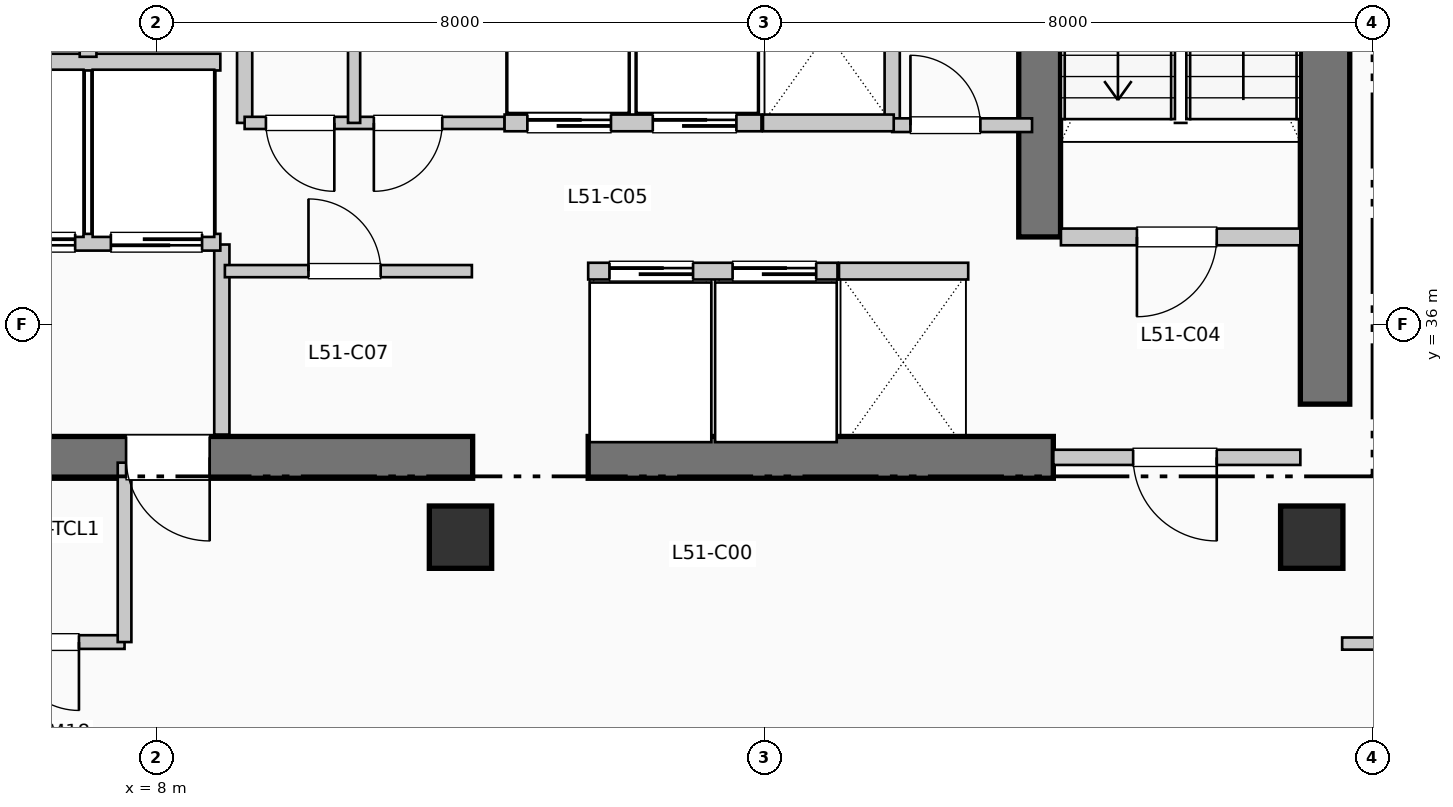
"""IFC4 building model, lengths in metres.
Left out: names, types, materials, properties, quantities, classifications, styles, units other than length and angle.
Written with IfcOpenShell. Run it as: python <this file> out.ifc"""

import sys

from ifc_helpers import new_model, si_unit, direction, frame, frame_2d, origin, origin_2d, place, context, subcontext, project, spatial, rectangle, extrude, element, fill, save


model = new_model("IFC4")
c1 = context("Model", 3, precision=1e-05, world=origin(), true_north=direction((0.0, 1.0)))
c2 = subcontext(c1, "Body", "Model", "MODEL_VIEW")
j1 = project(units=[si_unit("LENGTHUNIT", "METRE"), si_unit("PLANEANGLEUNIT", "RADIAN")], contexts=[c1])
p1 = place(None, origin())
s1 = spatial("IfcSite", under=j1, at=p1, CompositionType="ELEMENT")
p2 = place(p1, origin())
s2 = spatial("IfcBuilding", under=s1, at=p2, CompositionType="ELEMENT")
p3 = place(p2, frame((0.0, 0.0, 211.2)))
s3 = spatial("IfcBuildingStorey", under=s2, at=p3, CompositionType="ELEMENT", Elevation=211.2)
p4 = place(p3, frame((23.375, 34.95, 0.0), z_axis=(0.0, 0.0, 1.0), x_axis=(0.0, 1.0, 0.0)))
e1 = element("IfcWall", 1, at=p4, inside=s3, PredefinedType="SHEAR", context=c2, shape_type="SweptSolid", body=[
    extrude(rectangle(XDim=10.64, YDim=0.65, at=frame_2d((5.32, 0.0))), origin(), (0.0, 0.0, 1.0), 3.96),
])
p5 = place(p3, frame((1.45, 34.25, 0.0), z_axis=(0.0, 0.0, 1.0), x_axis=(1.0, 0.0, 0.0)))
e2 = element("IfcWall", 2, at=p5, inside=s3, PredefinedType="SHEAR", context=c2, shape_type="SweptSolid", body=[
    extrude(rectangle(XDim=10.71, YDim=0.55, at=frame_2d((5.355, 0.0))), origin(), (0.0, 0.0, 1.0), 3.96),
])
p6 = place(p5, frame((7.25, 0.0, 0.0), z_axis=(0.0, 0.0, 1.0), x_axis=(-1.0, 0.0, 0.0)))
e3 = element("IfcOpeningElement", 3, at=p6, cuts=e2, PredefinedType="OPENING", context=c2, shape_type="SweptSolid", body=[
    extrude(rectangle(XDim=1.1, YDim=2.15, at=frame_2d((0.55, 1.075))), frame((0.0, 0.285, 0.0), z_axis=(0.0, -1.0, 0.0), x_axis=(1.0, 0.0, 0.0)), (0.0, 0.0, 1.0), 0.57),
])
p7 = place(p3, frame((13.68, 34.25, 0.0), z_axis=(0.0, 0.0, 1.0), x_axis=(1.0, 0.0, 0.0)))
e4 = element("IfcWall", 4, at=p7, inside=s3, PredefinedType="SHEAR", context=c2, shape_type="SweptSolid", body=[
    extrude(rectangle(XDim=6.12, YDim=0.55, at=frame_2d((3.06, 0.0))), origin(), (0.0, 0.0, 1.0), 3.96),
])
p8 = place(p3, frame((19.62, 37.15, 0.0), z_axis=(0.0, 0.0, 1.0), x_axis=(0.0, 1.0, 0.0)))
e5 = element("IfcWall", 5, at=p8, inside=s3, PredefinedType="SHEAR", context=c2, shape_type="SweptSolid", body=[
    extrude(rectangle(XDim=7.89, YDim=0.55, at=frame_2d((3.945, 0.0))), origin(), (0.0, 0.0, 1.0), 3.96),
])
for number, where, z_axis, x_axis in (
    (6, (12.0, 33.2, 0.0), (0.0, 0.0, 1.0), (1.0, 0.0, 0.0)),
    (7, (23.2, 33.2, 0.0), (0.0, 0.0, 1.0), (1.0, 0.0, 0.0)),
):
    element("IfcColumn", number, at=place(p3, frame(where, z_axis=z_axis, x_axis=x_axis)), inside=s3, PredefinedType="COLUMN", context=c2, shape_type="SweptSolid", body=[
        extrude(rectangle(XDim=0.82, YDim=0.82, at=origin_2d()), origin(), (0.0, 0.0, 1.0), 3.96),
    ])
p9 = place(p3, frame((8.86, 34.55, 0.0), z_axis=(0.0, 0.0, 1.0), x_axis=(0.0, 1.0, 0.0)))
e8 = element("IfcWall", 8, at=p9, inside=s3, PredefinedType="PARTITIONING", context=c2, shape_type="SweptSolid", body=[
    extrude(rectangle(XDim=2.5, YDim=0.2, at=frame_2d((1.25, 0.0))), origin(), (0.0, 0.0, 1.0), 3.71),
])
p10 = place(p3, frame((19.9, 37.15, 0.0), z_axis=(0.0, 0.0, 1.0), x_axis=(1.0, 0.0, 0.0)))
e9 = element("IfcWall", 9, at=p10, inside=s3, PredefinedType="PARTITIONING", context=c2, shape_type="SweptSolid", body=[
    extrude(rectangle(XDim=3.15, YDim=0.22, at=frame_2d((1.575, 0.0))), origin(), (0.0, 0.0, 1.0), 3.71),
])
p11 = place(p10, frame((2.05, 0.0, 0.0), z_axis=(0.0, 0.0, 1.0), x_axis=(-1.0, 0.0, 0.0)))
e10 = element("IfcOpeningElement", 10, at=p11, cuts=e9, PredefinedType="OPENING", context=c2, shape_type="SweptSolid", body=[
    extrude(rectangle(XDim=1.05, YDim=2.15, at=frame_2d((0.525, 1.075))), frame((0.0, 0.12, 0.0), z_axis=(0.0, -1.0, 0.0), x_axis=(1.0, 0.0, 0.0)), (0.0, 0.0, 1.0), 0.24),
])
p12 = place(p3, frame((19.8, 34.25, 0.0), z_axis=(0.0, 0.0, 1.0), x_axis=(1.0, 0.0, 0.0)))
e11 = element("IfcWall", 11, at=p12, inside=s3, PredefinedType="PARTITIONING", context=c2, shape_type="SweptSolid", body=[
    extrude(rectangle(XDim=3.25, YDim=0.2, at=frame_2d((1.625, 0.0))), origin(), (0.0, 0.0, 1.0), 3.71),
])
p13 = place(p12, frame((2.15, 0.0, 0.0), z_axis=(0.0, 0.0, 1.0), x_axis=(-1.0, 0.0, 0.0)))
e12 = element("IfcOpeningElement", 12, at=p13, cuts=e11, PredefinedType="OPENING", context=c2, shape_type="SweptSolid", body=[
    extrude(rectangle(XDim=1.1, YDim=2.15, at=frame_2d((0.55, 1.075))), frame((0.0, 0.11, 0.0), z_axis=(0.0, -1.0, 0.0), x_axis=(1.0, 0.0, 0.0)), (0.0, 0.0, 1.0), 0.22),
])
p14 = place(p3, frame((5.38, 37.08, 0.0), z_axis=(0.0, 0.0, 1.0), x_axis=(1.0, 0.0, 0.0)))
e13 = element("IfcWall", 13, at=p14, inside=s3, PredefinedType="PARTITIONING", context=c2, shape_type="SweptSolid", body=[
    extrude(rectangle(XDim=3.46, YDim=0.22, at=frame_2d((1.73, 0.0))), origin(), (0.0, 0.0, 1.0), 3.71),
])
p15 = place(p14, frame((1.55, 0.0, 0.0), z_axis=(0.0, 0.0, 1.0), x_axis=(-1.0, 0.0, 0.0)))
e14 = element("IfcOpeningElement", 14, at=p15, cuts=e13, PredefinedType="OPENING", context=c2, shape_type="SweptSolid", body=[
    extrude(rectangle(XDim=1.2, YDim=2.2, at=frame_2d((0.6, 1.1))), frame((0.0, 0.12, 0.0), z_axis=(0.0, -1.0, 0.0), x_axis=(1.0, 0.0, 0.0)), (0.0, 0.0, 1.0), 0.24),
])
p16 = place(p14, frame((3.22, 0.0, 0.0), z_axis=(0.0, 0.0, 1.0), x_axis=(-1.0, 0.0, 0.0)))
e15 = element("IfcOpeningElement", 15, at=p16, cuts=e13, PredefinedType="OPENING", context=c2, shape_type="SweptSolid", body=[
    extrude(rectangle(XDim=1.2, YDim=2.2, at=frame_2d((0.6, 1.1))), frame((0.0, 0.12, 0.0), z_axis=(0.0, -1.0, 0.0), x_axis=(1.0, 0.0, 0.0)), (0.0, 0.0, 1.0), 0.24),
])
p17 = place(p3, frame((5.38, 39.45, 0.0), z_axis=(0.0, 0.0, 1.0), x_axis=(1.0, 0.0, 0.0)))
e16 = element("IfcWall", 16, at=p17, inside=s3, PredefinedType="PARTITIONING", context=c2, shape_type="SweptSolid", body=[
    extrude(rectangle(XDim=3.46, YDim=0.22, at=frame_2d((1.73, 0.0))), origin(), (0.0, 0.0, 1.0), 3.71),
])
p18 = place(p3, frame((7.1, 39.52, 0.0), z_axis=(0.0, 0.0, 1.0), x_axis=(0.0, 1.0, 0.0)))
e17 = element("IfcWall", 17, at=p18, inside=s3, PredefinedType="PARTITIONING", context=c2, shape_type="SweptSolid", body=[
    extrude(rectangle(XDim=2.93, YDim=0.22, at=frame_2d((1.465, 0.0))), origin(), (0.0, 0.0, 1.0), 3.71),
])
for number, where, z_axis, x_axis in (
    (18, (9.16, 38.65, 0.0), (0.0, 0.0, 1.0), (0.0, 1.0, 0.0)),
    (19, (17.68, 38.65, 0.0), (0.0, 0.0, 1.0), (0.0, 1.0, 0.0)),
):
    element("IfcWall", number, at=place(p3, frame(where, z_axis=z_axis, x_axis=x_axis)), inside=s3, PredefinedType="PARTITIONING", context=c2, shape_type="SweptSolid", body=[
        extrude(rectangle(XDim=2.35, YDim=0.2, at=frame_2d((1.175, 0.0))), origin(), (0.0, 0.0, 1.0), 3.71),
    ])
p19 = place(p3, frame((17.68, 38.62, 0.0), z_axis=(0.0, 0.0, 1.0), x_axis=(1.0, 0.0, 0.0)))
e20 = element("IfcWall", 20, at=p19, inside=s3, PredefinedType="PARTITIONING", context=c2, shape_type="SweptSolid", body=[
    extrude(rectangle(XDim=1.84, YDim=0.18, at=frame_2d((0.92, 0.0))), origin(), (0.0, 0.0, 1.0), 3.71),
])
p20 = place(p19, frame((0.24, 0.0, 0.0)))
e21 = element("IfcOpeningElement", 21, at=p20, cuts=e20, PredefinedType="OPENING", context=c2, shape_type="SweptSolid", body=[
    extrude(rectangle(XDim=0.92, YDim=2.1, at=frame_2d((0.46, 1.05))), frame((0.0, 0.1, 0.0), z_axis=(0.0, -1.0, 0.0), x_axis=(1.0, 0.0, 0.0)), (0.0, 0.0, 1.0), 0.2),
])
p21 = place(p3, frame((5.5, 31.82, 0.0), z_axis=(0.0, 0.0, 1.0), x_axis=(1.0, 0.0, 0.0)))
e22 = element("IfcWall", 22, at=p21, inside=s3, PredefinedType="PLUMBINGWALL", context=c2, shape_type="SweptSolid", body=[
    extrude(rectangle(XDim=2.08, YDim=0.18, at=frame_2d((1.04, 0.0))), origin(), (0.0, 0.0, 1.0), 3.71),
])
p22 = place(p21, frame((1.48, 0.0, 0.0), z_axis=(0.0, 0.0, 1.0), x_axis=(-1.0, 0.0, 0.0)))
e23 = element("IfcOpeningElement", 23, at=p22, cuts=e22, PredefinedType="OPENING", context=c2, shape_type="SweptSolid", body=[
    extrude(rectangle(XDim=0.9, YDim=2.1, at=frame_2d((0.45, 1.05))), frame((0.0, 0.1, 0.0), z_axis=(0.0, -1.0, 0.0), x_axis=(1.0, 0.0, 0.0)), (0.0, 0.0, 1.0), 0.2),
])
p23 = place(p3, frame((7.58, 31.82, 0.0), z_axis=(0.0, 0.0, 1.0), x_axis=(0.0, 1.0, 0.0)))
e24 = element("IfcWall", 24, at=p23, inside=s3, PredefinedType="PLUMBINGWALL", context=c2, shape_type="SweptSolid", body=[
    extrude(rectangle(XDim=2.36, YDim=0.18, at=frame_2d((1.18, 0.0))), origin(), (0.0, 0.0, 1.0), 3.71),
])
p24 = place(p3, frame((8.9, 36.7, 0.0), z_axis=(0.0, 0.0, 1.0), x_axis=(1.0, 0.0, 0.0)))
e25 = element("IfcWall", 25, at=p24, inside=s3, PredefinedType="PARTITIONING", context=c2, shape_type="SweptSolid", body=[
    extrude(rectangle(XDim=3.25, YDim=0.16, at=frame_2d((1.625, 0.0))), origin(), (0.0, 0.0, 1.0), 3.71),
])
p25 = place(p24, frame((1.1, 0.0, 0.0)))
e26 = element("IfcOpeningElement", 26, at=p25, cuts=e25, PredefinedType="OPENING", context=c2, shape_type="SweptSolid", body=[
    extrude(rectangle(XDim=0.95, YDim=2.15, at=frame_2d((0.475, 1.075))), frame((0.0, 0.09, 0.0), z_axis=(0.0, -1.0, 0.0), x_axis=(1.0, 0.0, 0.0)), (0.0, 0.0, 1.0), 0.18),
])
p26 = place(p3, frame((9.16, 38.65, 0.0), z_axis=(0.0, 0.0, 1.0), x_axis=(1.0, 0.0, 0.0)))
e27 = element("IfcWall", 27, at=p26, inside=s3, PredefinedType="PARTITIONING", context=c2, shape_type="SweptSolid", body=[
    extrude(rectangle(XDim=3.42, YDim=0.16, at=frame_2d((1.71, 0.0))), origin(), (0.0, 0.0, 1.0), 3.71),
])
p27 = place(p26, frame((1.18, 0.0, 0.0), z_axis=(0.0, 0.0, 1.0), x_axis=(-1.0, 0.0, 0.0)))
e28 = element("IfcOpeningElement", 28, at=p27, cuts=e27, PredefinedType="OPENING", context=c2, shape_type="SweptSolid", body=[
    extrude(rectangle(XDim=0.9, YDim=2.15, at=frame_2d((0.45, 1.075))), frame((0.0, 0.09, 0.0), z_axis=(0.0, -1.0, 0.0), x_axis=(1.0, 0.0, 0.0)), (0.0, 0.0, 1.0), 0.18),
])
p28 = place(p26, frame((2.6, 0.0, 0.0), z_axis=(0.0, 0.0, 1.0), x_axis=(-1.0, 0.0, 0.0)))
e29 = element("IfcOpeningElement", 29, at=p28, cuts=e27, PredefinedType="OPENING", context=c2, shape_type="SweptSolid", body=[
    extrude(rectangle(XDim=0.9, YDim=2.15, at=frame_2d((0.45, 1.075))), frame((0.0, 0.09, 0.0), z_axis=(0.0, -1.0, 0.0), x_axis=(1.0, 0.0, 0.0)), (0.0, 0.0, 1.0), 0.18),
])
p29 = place(p3, frame((10.6, 38.65, 0.0), z_axis=(0.0, 0.0, 1.0), x_axis=(0.0, 1.0, 0.0)))
e30 = element("IfcWall", 30, at=p29, inside=s3, PredefinedType="PARTITIONING", context=c2, shape_type="SweptSolid", body=[
    extrude(rectangle(XDim=2.35, YDim=0.16, at=frame_2d((1.175, 0.0))), origin(), (0.0, 0.0, 1.0), 3.71),
])
p30 = place(p3, frame((13.68, 36.7, 0.0), z_axis=(0.0, 0.0, 1.0), x_axis=(1.0, 0.0, 0.0)))
e31 = element("IfcWall", 31, at=p30, inside=s3, PredefinedType="PARTITIONING", context=c2, shape_type="SweptSolid", body=[
    extrude(rectangle(XDim=3.28, YDim=0.22, at=frame_2d((1.64, 0.0))), origin(), (0.0, 0.0, 1.0), 3.71),
])
p31 = place(p30, frame((0.28, 0.0, 0.0)))
e32 = element("IfcOpeningElement", 32, at=p31, cuts=e31, PredefinedType="OPENING", context=c2, shape_type="SweptSolid", body=[
    extrude(rectangle(XDim=1.1, YDim=2.2, at=frame_2d((0.55, 1.1))), frame((0.0, 0.12, 0.0), z_axis=(0.0, -1.0, 0.0), x_axis=(1.0, 0.0, 0.0)), (0.0, 0.0, 1.0), 0.24),
])
p32 = place(p30, frame((1.9, 0.0, 0.0)))
e33 = element("IfcOpeningElement", 33, at=p32, cuts=e31, PredefinedType="OPENING", context=c2, shape_type="SweptSolid", body=[
    extrude(rectangle(XDim=1.1, YDim=2.2, at=frame_2d((0.55, 1.1))), frame((0.0, 0.12, 0.0), z_axis=(0.0, -1.0, 0.0), x_axis=(1.0, 0.0, 0.0)), (0.0, 0.0, 1.0), 0.24),
])
p33 = place(p3, frame((12.58, 38.65, 0.0), z_axis=(0.0, 0.0, 1.0), x_axis=(1.0, 0.0, 0.0)))
e34 = element("IfcWall", 34, at=p33, inside=s3, PredefinedType="PARTITIONING", context=c2, shape_type="SweptSolid", body=[
    extrude(rectangle(XDim=3.38, YDim=0.22, at=frame_2d((1.69, 0.0))), origin(), (0.0, 0.0, 1.0), 3.71),
])
p34 = place(p33, frame((0.3, 0.0, 0.0)))
e35 = element("IfcOpeningElement", 35, at=p34, cuts=e34, PredefinedType="OPENING", context=c2, shape_type="SweptSolid", body=[
    extrude(rectangle(XDim=1.1, YDim=2.2, at=frame_2d((0.55, 1.1))), frame((0.0, 0.12, 0.0), z_axis=(0.0, -1.0, 0.0), x_axis=(1.0, 0.0, 0.0)), (0.0, 0.0, 1.0), 0.24),
])
p35 = place(p33, frame((1.95, 0.0, 0.0)))
e36 = element("IfcOpeningElement", 36, at=p35, cuts=e34, PredefinedType="OPENING", context=c2, shape_type="SweptSolid", body=[
    extrude(rectangle(XDim=1.1, YDim=2.2, at=frame_2d((0.55, 1.1))), frame((0.0, 0.12, 0.0), z_axis=(0.0, -1.0, 0.0), x_axis=(1.0, 0.0, 0.0)), (0.0, 0.0, 1.0), 0.24),
])
p36 = place(p3, frame((16.98, 36.7, 0.0), z_axis=(0.0, 0.0, 1.0), x_axis=(1.0, 0.0, 0.0)))
e37 = element("IfcWall", 37, at=p36, inside=s3, PredefinedType="PARTITIONING", context=c2, shape_type="SweptSolid", body=[
    extrude(rectangle(XDim=1.7, YDim=0.22, at=frame_2d((0.85, 0.0))), origin(), (0.0, 0.0, 1.0), 3.71),
])
p37 = place(p3, frame((15.98, 38.65, 0.0), z_axis=(0.0, 0.0, 1.0), x_axis=(1.0, 0.0, 0.0)))
e38 = element("IfcWall", 38, at=p37, inside=s3, PredefinedType="PARTITIONING", context=c2, shape_type="SweptSolid", body=[
    extrude(rectangle(XDim=1.72, YDim=0.22, at=frame_2d((0.86, 0.0))), origin(), (0.0, 0.0, 1.0), 3.71),
])
p38 = place(p3, frame((23.6, 31.8, 0.0), z_axis=(0.0, 0.0, 1.0), x_axis=(1.0, 0.0, 0.0)))
e39 = element("IfcWall", 39, at=p38, inside=s3, PredefinedType="PARTITIONING", context=c2, shape_type="SweptSolid", body=[
    extrude(rectangle(XDim=26.41, YDim=0.16, at=frame_2d((13.205, 0.0))), origin(), (0.0, 0.0, 1.0), 3.71),
])
p39 = place(p38, frame((5.071, 0.0, 0.0)))
e40 = element("IfcOpeningElement", 40, at=p39, cuts=e39, PredefinedType="OPENING", context=c2, shape_type="SweptSolid", body=[
    extrude(rectangle(XDim=0.95, YDim=2.15, at=frame_2d((0.475, 1.075))), frame((0.0, 0.09, 0.0), z_axis=(0.0, -1.0, 0.0), x_axis=(1.0, 0.0, 0.0)), (0.0, 0.0, 1.0), 0.18),
])
p40 = place(p38, frame((18.276, 0.0, 0.0)))
e41 = element("IfcOpeningElement", 41, at=p40, cuts=e39, PredefinedType="OPENING", context=c2, shape_type="SweptSolid", body=[
    extrude(rectangle(XDim=0.95, YDim=2.15, at=frame_2d((0.475, 1.075))), frame((0.0, 0.09, 0.0), z_axis=(0.0, -1.0, 0.0), x_axis=(1.0, 0.0, 0.0)), (0.0, 0.0, 1.0), 0.18),
])
p41 = place(p6, origin())
e42 = element("IfcDoor", 42, at=p41, inside=s3, OperationType="SINGLE_SWING_RIGHT", PredefinedType="DOOR", context=c2, shape_type="SweptSolid", body=[
    extrude(rectangle(XDim=1.1, YDim=2.15, at=frame_2d((0.55, 1.075))), frame((0.0, 0.025, 0.0), z_axis=(0.0, -1.0, 0.0), x_axis=(1.0, 0.0, 0.0)), (0.0, 0.0, 1.0), 0.05),
])
fill(e3, e42)
p42 = place(p11, origin())
e43 = element("IfcDoor", 43, at=p42, inside=s3, OperationType="SINGLE_SWING_LEFT", PredefinedType="DOOR", context=c2, shape_type="SweptSolid", body=[
    extrude(rectangle(XDim=1.05, YDim=2.15, at=frame_2d((0.525, 1.075))), frame((0.0, 0.025, 0.0), z_axis=(0.0, -1.0, 0.0), x_axis=(1.0, 0.0, 0.0)), (0.0, 0.0, 1.0), 0.05),
])
fill(e10, e43)
p43 = place(p13, origin())
e44 = element("IfcDoor", 44, at=p43, inside=s3, OperationType="SINGLE_SWING_RIGHT", PredefinedType="DOOR", context=c2, shape_type="SweptSolid", body=[
    extrude(rectangle(XDim=1.1, YDim=2.15, at=frame_2d((0.55, 1.075))), frame((0.0, 0.025, 0.0), z_axis=(0.0, -1.0, 0.0), x_axis=(1.0, 0.0, 0.0)), (0.0, 0.0, 1.0), 0.05),
])
fill(e12, e44)
p44 = place(p15, origin())
e45 = element("IfcDoor", 45, at=p44, inside=s3, OperationType="SLIDING_TO_RIGHT", PredefinedType="DOOR", context=c2, shape_type="SweptSolid", body=[
    extrude(rectangle(XDim=1.2, YDim=2.2, at=frame_2d((0.6, 1.1))), frame((0.0, 0.025, 0.0), z_axis=(0.0, -1.0, 0.0), x_axis=(1.0, 0.0, 0.0)), (0.0, 0.0, 1.0), 0.05),
])
fill(e14, e45)
p45 = place(p16, origin())
e46 = element("IfcDoor", 46, at=p45, inside=s3, OperationType="SLIDING_TO_RIGHT", PredefinedType="DOOR", context=c2, shape_type="SweptSolid", body=[
    extrude(rectangle(XDim=1.2, YDim=2.2, at=frame_2d((0.6, 1.1))), frame((0.0, 0.025, 0.0), z_axis=(0.0, -1.0, 0.0), x_axis=(1.0, 0.0, 0.0)), (0.0, 0.0, 1.0), 0.05),
])
fill(e15, e46)
p46 = place(p20, origin())
e47 = element("IfcDoor", 47, at=p46, inside=s3, OperationType="SINGLE_SWING_LEFT", PredefinedType="DOOR", context=c2, shape_type="SweptSolid", body=[
    extrude(rectangle(XDim=0.92, YDim=2.1, at=frame_2d((0.46, 1.05))), frame((0.0, 0.025, 0.0), z_axis=(0.0, -1.0, 0.0), x_axis=(1.0, 0.0, 0.0)), (0.0, 0.0, 1.0), 0.05),
])
fill(e21, e47)
p47 = place(p22, origin())
e48 = element("IfcDoor", 48, at=p47, inside=s3, OperationType="SINGLE_SWING_RIGHT", PredefinedType="DOOR", context=c2, shape_type="SweptSolid", body=[
    extrude(rectangle(XDim=0.9, YDim=2.1, at=frame_2d((0.45, 1.05))), frame((0.0, 0.025, 0.0), z_axis=(0.0, -1.0, 0.0), x_axis=(1.0, 0.0, 0.0)), (0.0, 0.0, 1.0), 0.05),
])
fill(e23, e48)
p48 = place(p25, origin())
e49 = element("IfcDoor", 49, at=p48, inside=s3, OperationType="SINGLE_SWING_LEFT", PredefinedType="DOOR", context=c2, shape_type="SweptSolid", body=[
    extrude(rectangle(XDim=0.95, YDim=2.15, at=frame_2d((0.475, 1.075))), frame((0.0, 0.025, 0.0), z_axis=(0.0, -1.0, 0.0), x_axis=(1.0, 0.0, 0.0)), (0.0, 0.0, 1.0), 0.05),
])
fill(e26, e49)
p49 = place(p27, origin())
e50 = element("IfcDoor", 50, at=p49, inside=s3, OperationType="SINGLE_SWING_RIGHT", PredefinedType="DOOR", context=c2, shape_type="SweptSolid", body=[
    extrude(rectangle(XDim=0.9, YDim=2.15, at=frame_2d((0.45, 1.075))), frame((0.0, 0.025, 0.0), z_axis=(0.0, -1.0, 0.0), x_axis=(1.0, 0.0, 0.0)), (0.0, 0.0, 1.0), 0.05),
])
fill(e28, e50)
p50 = place(p28, origin())
e51 = element("IfcDoor", 51, at=p50, inside=s3, OperationType="SINGLE_SWING_LEFT", PredefinedType="DOOR", context=c2, shape_type="SweptSolid", body=[
    extrude(rectangle(XDim=0.9, YDim=2.15, at=frame_2d((0.45, 1.075))), frame((0.0, 0.025, 0.0), z_axis=(0.0, -1.0, 0.0), x_axis=(1.0, 0.0, 0.0)), (0.0, 0.0, 1.0), 0.05),
])
fill(e29, e51)
p51 = place(p31, origin())
e52 = element("IfcDoor", 52, at=p51, inside=s3, OperationType="SLIDING_TO_RIGHT", PredefinedType="DOOR", context=c2, shape_type="SweptSolid", body=[
    extrude(rectangle(XDim=1.1, YDim=2.2, at=frame_2d((0.55, 1.1))), frame((0.0, 0.025, 0.0), z_axis=(0.0, -1.0, 0.0), x_axis=(1.0, 0.0, 0.0)), (0.0, 0.0, 1.0), 0.05),
])
fill(e32, e52)
p52 = place(p32, origin())
e53 = element("IfcDoor", 53, at=p52, inside=s3, OperationType="SLIDING_TO_RIGHT", PredefinedType="DOOR", context=c2, shape_type="SweptSolid", body=[
    extrude(rectangle(XDim=1.1, YDim=2.2, at=frame_2d((0.55, 1.1))), frame((0.0, 0.025, 0.0), z_axis=(0.0, -1.0, 0.0), x_axis=(1.0, 0.0, 0.0)), (0.0, 0.0, 1.0), 0.05),
])
fill(e33, e53)
p53 = place(p34, origin())
e54 = element("IfcDoor", 54, at=p53, inside=s3, OperationType="SLIDING_TO_RIGHT", PredefinedType="DOOR", context=c2, shape_type="SweptSolid", body=[
    extrude(rectangle(XDim=1.1, YDim=2.2, at=frame_2d((0.55, 1.1))), frame((0.0, 0.025, 0.0), z_axis=(0.0, -1.0, 0.0), x_axis=(1.0, 0.0, 0.0)), (0.0, 0.0, 1.0), 0.05),
])
fill(e35, e54)
p54 = place(p35, origin())
e55 = element("IfcDoor", 55, at=p54, inside=s3, OperationType="SLIDING_TO_RIGHT", PredefinedType="DOOR", context=c2, shape_type="SweptSolid", body=[
    extrude(rectangle(XDim=1.1, YDim=2.2, at=frame_2d((0.55, 1.1))), frame((0.0, 0.025, 0.0), z_axis=(0.0, -1.0, 0.0), x_axis=(1.0, 0.0, 0.0)), (0.0, 0.0, 1.0), 0.05),
])
fill(e36, e55)
save(model, sys.argv[1])
